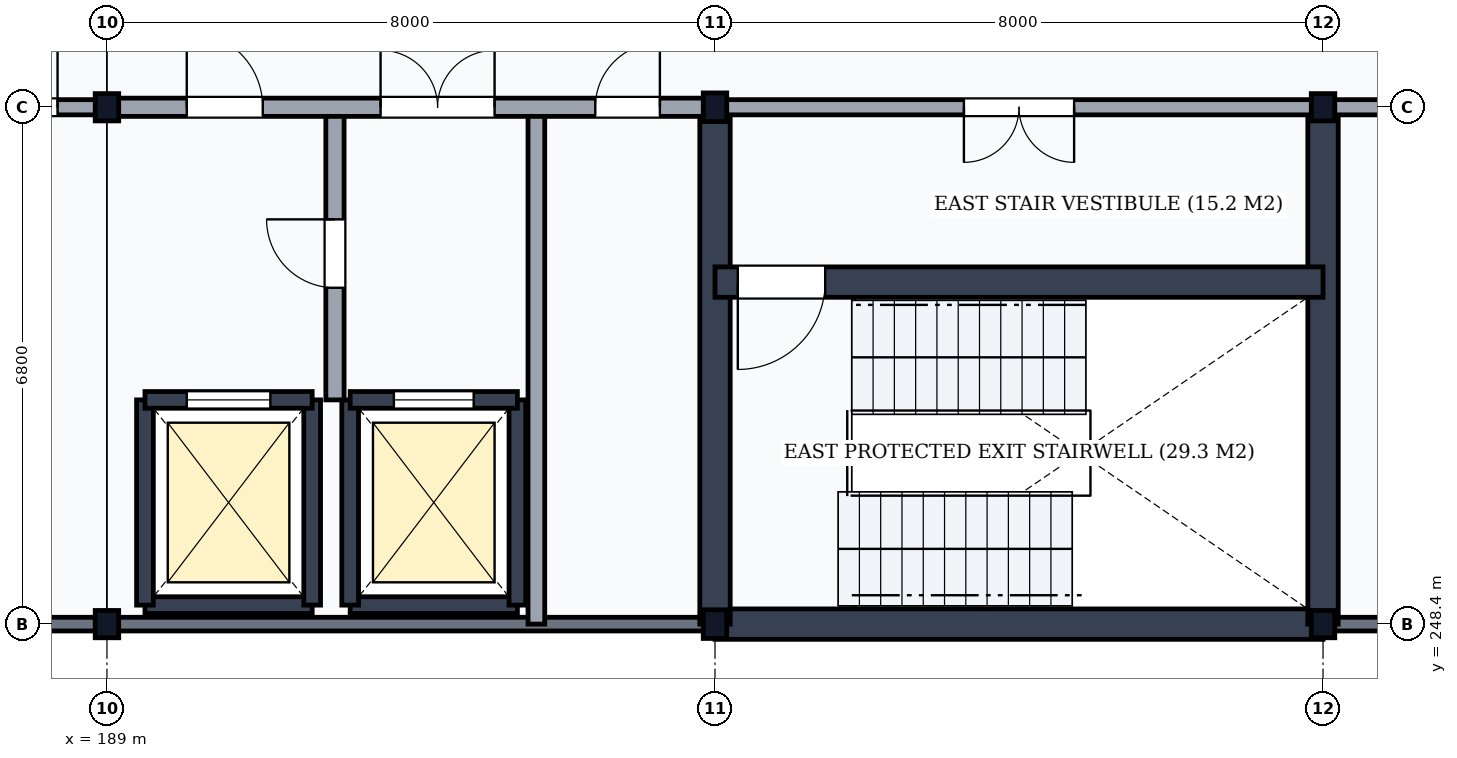
"""IFC4 building model, lengths in metres.
Left out: names, types, materials, properties, quantities, classifications, styles, units other than length and angle.
Written with IfcOpenShell. Run it as: python <this file> out.ifc"""

import sys

from ifc_helpers import new_model, si_unit, direction, frame, frame_2d, origin, origin_2d, place, context, subcontext, project, spatial, rectangle, i_section, extrude, element, fill, save


model = new_model("IFC4")
c1 = context("Model", 3, precision=1e-05, world=origin(), true_north=direction((0.0, 1.0)))
c2 = subcontext(c1, "Body", "Model", "MODEL_VIEW")
j1 = project(units=[si_unit("LENGTHUNIT", "METRE"), si_unit("PLANEANGLEUNIT", "RADIAN")], contexts=[c1])
p1 = place(None, origin())
s1 = spatial("IfcSite", under=j1, at=p1, CompositionType="ELEMENT")
p2 = place(p1, origin())
s2 = spatial("IfcBuilding", under=s1, at=p2, CompositionType="ELEMENT")
p3 = place(p2, frame((0.0, 0.0, 47.7)))
s3 = spatial("IfcBuildingStorey", under=s2, at=p3, CompositionType="ELEMENT", Elevation=47.7)
for number, where, z_axis, x_axis in (
    (1, (189.0, 248.4, 0.0), (0.0, 0.0, 1.0), (1.0, 0.0, 0.0)),
    (2, (189.0, 255.2, 0.0), (0.0, 0.0, 1.0), (1.0, 0.0, 0.0)),
):
    element("IfcColumn", number, at=place(p3, frame(where, z_axis=z_axis, x_axis=x_axis)), inside=s3, PredefinedType="COLUMN", context=c2, shape_type="SweptSolid", body=[
        extrude(i_section(OverallWidth=0.309, OverallDepth=0.359, WebThickness=0.021, FlangeThickness=0.04, FilletRadius=0.027, at=origin_2d()), origin(), (0.0, 0.0, 1.0), 3.9),
    ])
for number, where, z_axis, x_axis in (
    (3, (197.0, 248.4, 0.0), (0.0, 0.0, 1.0), (1.0, 0.0, 0.0)),
    (4, (197.0, 255.2, 0.0), (0.0, 0.0, 1.0), (1.0, 0.0, 0.0)),
):
    element("IfcColumn", number, at=place(p3, frame(where, z_axis=z_axis, x_axis=x_axis)), inside=s3, PredefinedType="COLUMN", context=c2, shape_type="SweptSolid", body=[
        extrude(i_section(OverallWidth=0.309, OverallDepth=0.377, WebThickness=0.021, FlangeThickness=0.04, FilletRadius=0.027, at=origin_2d()), origin(), (0.0, 0.0, 1.0), 3.9),
    ])
for number, where, z_axis, x_axis in (
    (5, (205.0, 248.4, 0.0), (0.0, 0.0, 1.0), (1.0, 0.0, 0.0)),
    (6, (205.0, 255.2, 0.0), (0.0, 0.0, 1.0), (1.0, 0.0, 0.0)),
):
    element("IfcColumn", number, at=place(p3, frame(where, z_axis=z_axis, x_axis=x_axis)), inside=s3, PredefinedType="COLUMN", context=c2, shape_type="SweptSolid", body=[
        extrude(i_section(OverallWidth=0.309, OverallDepth=0.359, WebThickness=0.021, FlangeThickness=0.04, FilletRadius=0.027, at=origin_2d()), origin(), (0.0, 0.0, 1.0), 3.9),
    ])
p4 = place(p3, frame((181.006, 248.4, 0.0), z_axis=(0.0, 0.0, 1.0), x_axis=(1.0, 0.0, 0.0)))
e7 = element("IfcWall", 7, at=p4, inside=s3, PredefinedType="SOLIDWALL", context=c2, shape_type="SweptSolid", body=[
    extrude(rectangle(XDim=7.988, YDim=0.18, at=frame_2d((3.994, 0.0))), origin(), (0.0, 0.0, 1.0), 3.298),
])
p5 = place(p4, frame((2.894, 0.0, 0.95)))
e8 = element("IfcOpeningElement", 8, at=p5, cuts=e7, PredefinedType="OPENING", context=c2, shape_type="SweptSolid", body=[
    extrude(rectangle(XDim=1.6, YDim=2.0, at=frame_2d((0.8, 1.0))), frame((0.0, 0.105, 0.0), z_axis=(0.0, -1.0, 0.0), x_axis=(1.0, 0.0, 0.0)), (0.0, 0.0, 1.0), 0.21),
])
p6 = place(p3, frame((189.006, 248.4, 0.0), z_axis=(0.0, 0.0, 1.0), x_axis=(1.0, 0.0, 0.0)))
e9 = element("IfcWall", 9, at=p6, inside=s3, PredefinedType="SOLIDWALL", context=c2, shape_type="SweptSolid", body=[
    extrude(rectangle(XDim=7.988, YDim=0.18, at=frame_2d((3.994, 0.0))), origin(), (0.0, 0.0, 1.0), 3.298),
])
p7 = place(p3, frame((205.006, 248.4, 0.0), z_axis=(0.0, 0.0, 1.0), x_axis=(1.0, 0.0, 0.0)))
e10 = element("IfcWall", 10, at=p7, inside=s3, PredefinedType="SOLIDWALL", context=c2, shape_type="SweptSolid", body=[
    extrude(rectangle(XDim=7.988, YDim=0.18, at=frame_2d((3.994, 0.0))), origin(), (0.0, 0.0, 1.0), 3.298),
])
p8 = place(p7, frame((3.394, 0.0, 0.95)))
e11 = element("IfcOpeningElement", 11, at=p8, cuts=e10, PredefinedType="OPENING", context=c2, shape_type="SweptSolid", body=[
    extrude(rectangle(XDim=1.2, YDim=1.8, at=frame_2d((0.6, 0.9))), frame((0.0, 0.105, 0.0), z_axis=(0.0, -1.0, 0.0), x_axis=(1.0, 0.0, 0.0)), (0.0, 0.0, 1.0), 0.21),
])
p9 = place(p3, frame((197.0, 248.4, 0.0), z_axis=(0.0, 0.0, 1.0), x_axis=(1.0, 0.0, 0.0)))
e12 = element("IfcWall", 12, at=p9, inside=s3, PredefinedType="SHEAR", context=c2, shape_type="SweptSolid", body=[
    extrude(rectangle(XDim=8.0, YDim=0.4, at=frame_2d((4.0, 0.0))), origin(), (0.0, 0.0, 1.0), 3.61),
])
for number, where, z_axis, x_axis in (
    (13, (197.0, 248.4, 0.0), (0.0, 0.0, 1.0), (0.0, 1.0, 0.0)),
    (14, (205.0, 248.4, 0.0), (0.0, 0.0, 1.0), (0.0, 1.0, 0.0)),
):
    element("IfcWall", number, at=place(p3, frame(where, z_axis=z_axis, x_axis=x_axis)), inside=s3, PredefinedType="SHEAR", context=c2, shape_type="SweptSolid", body=[
        extrude(rectangle(XDim=6.8, YDim=0.4, at=frame_2d((3.4, 0.0))), origin(), (0.0, 0.0, 1.0), 3.61),
    ])
p10 = place(p3, frame((197.0, 252.9, 0.0), z_axis=(0.0, 0.0, 1.0), x_axis=(1.0, 0.0, 0.0)))
e15 = element("IfcWall", 15, at=p10, inside=s3, PredefinedType="SHEAR", context=c2, shape_type="SweptSolid", body=[
    extrude(rectangle(XDim=8.0, YDim=0.4, at=frame_2d((4.0, 0.0))), origin(), (0.0, 0.0, 1.0), 3.61),
])
p11 = place(p10, frame((0.3, 0.0, 0.0)))
e16 = element("IfcOpeningElement", 16, at=p11, cuts=e15, PredefinedType="OPENING", context=c2, shape_type="SweptSolid", body=[
    extrude(rectangle(XDim=1.15, YDim=2.15, at=frame_2d((0.575, 1.075))), frame((0.0, 0.215, 0.0), z_axis=(0.0, -1.0, 0.0), x_axis=(1.0, 0.0, 0.0)), (0.0, 0.0, 1.0), 0.43),
])
p12 = place(p3, frame((197.0, 255.2, 0.0), z_axis=(0.0, 0.0, 1.0), x_axis=(1.0, 0.0, 0.0)))
e17 = element("IfcWall", 17, at=p12, inside=s3, PredefinedType="PARTITIONING", context=c2, shape_type="SweptSolid", body=[
    extrude(rectangle(XDim=8.0, YDim=0.2, at=frame_2d((4.0, 0.0))), origin(), (0.0, 0.0, 1.0), 3.108),
])
p13 = place(p12, frame((3.275, 0.0, 0.0)))
e18 = element("IfcOpeningElement", 18, at=p13, cuts=e17, PredefinedType="OPENING", context=c2, shape_type="SweptSolid", body=[
    extrude(rectangle(XDim=1.45, YDim=2.2, at=frame_2d((0.725, 1.1))), frame((0.0, 0.115, 0.0), z_axis=(0.0, -1.0, 0.0), x_axis=(1.0, 0.0, 0.0)), (0.0, 0.0, 1.0), 0.23),
])
p14 = place(p3, frame((189.5, 248.65, 0.0), z_axis=(0.0, 0.0, 1.0), x_axis=(1.0, 0.0, 0.0)))
e19 = element("IfcWall", 19, at=p14, inside=s3, PredefinedType="SHEAR", context=c2, shape_type="SweptSolid", body=[
    extrude(rectangle(XDim=2.2, YDim=0.22, at=frame_2d((1.1, 0.0))), origin(), (0.0, 0.0, 1.0), 3.61),
])
for number, where, z_axis, x_axis in (
    (20, (189.5, 248.65, 0.0), (0.0, 0.0, 1.0), (0.0, 1.0, 0.0)),
    (21, (191.7, 248.65, 0.0), (0.0, 0.0, 1.0), (0.0, 1.0, 0.0)),
):
    element("IfcWall", number, at=place(p3, frame(where, z_axis=z_axis, x_axis=x_axis)), inside=s3, PredefinedType="SHEAR", context=c2, shape_type="SweptSolid", body=[
        extrude(rectangle(XDim=2.7, YDim=0.22, at=frame_2d((1.35, 0.0))), origin(), (0.0, 0.0, 1.0), 3.61),
    ])
p15 = place(p3, frame((189.5, 251.35, 0.0), z_axis=(0.0, 0.0, 1.0), x_axis=(1.0, 0.0, 0.0)))
e22 = element("IfcWall", 22, at=p15, inside=s3, PredefinedType="SHEAR", context=c2, shape_type="SweptSolid", body=[
    extrude(rectangle(XDim=2.2, YDim=0.22, at=frame_2d((1.1, 0.0))), origin(), (0.0, 0.0, 1.0), 3.61),
])
p16 = place(p15, frame((0.55, 0.0, 0.0)))
e23 = element("IfcOpeningElement", 23, at=p16, cuts=e22, PredefinedType="OPENING", context=c2, shape_type="SweptSolid", body=[
    extrude(rectangle(XDim=1.1, YDim=2.15, at=frame_2d((0.55, 1.075))), frame((0.0, 0.125, 0.0), z_axis=(0.0, -1.0, 0.0), x_axis=(1.0, 0.0, 0.0)), (0.0, 0.0, 1.0), 0.25),
])
p17 = place(p3, frame((192.2, 248.65, 0.0), z_axis=(0.0, 0.0, 1.0), x_axis=(1.0, 0.0, 0.0)))
e24 = element("IfcWall", 24, at=p17, inside=s3, PredefinedType="SHEAR", context=c2, shape_type="SweptSolid", body=[
    extrude(rectangle(XDim=2.2, YDim=0.22, at=frame_2d((1.1, 0.0))), origin(), (0.0, 0.0, 1.0), 3.61),
])
for number, where, z_axis, x_axis in (
    (25, (192.2, 248.65, 0.0), (0.0, 0.0, 1.0), (0.0, 1.0, 0.0)),
    (26, (194.4, 248.65, 0.0), (0.0, 0.0, 1.0), (0.0, 1.0, 0.0)),
):
    element("IfcWall", number, at=place(p3, frame(where, z_axis=z_axis, x_axis=x_axis)), inside=s3, PredefinedType="SHEAR", context=c2, shape_type="SweptSolid", body=[
        extrude(rectangle(XDim=2.7, YDim=0.22, at=frame_2d((1.35, 0.0))), origin(), (0.0, 0.0, 1.0), 3.61),
    ])
p18 = place(p3, frame((192.2, 251.35, 0.0), z_axis=(0.0, 0.0, 1.0), x_axis=(1.0, 0.0, 0.0)))
e27 = element("IfcWall", 27, at=p18, inside=s3, PredefinedType="SHEAR", context=c2, shape_type="SweptSolid", body=[
    extrude(rectangle(XDim=2.2, YDim=0.22, at=frame_2d((1.1, 0.0))), origin(), (0.0, 0.0, 1.0), 3.61),
])
p19 = place(p18, frame((0.575, 0.0, 0.0)))
e28 = element("IfcOpeningElement", 28, at=p19, cuts=e27, PredefinedType="OPENING", context=c2, shape_type="SweptSolid", body=[
    extrude(rectangle(XDim=1.05, YDim=2.15, at=frame_2d((0.525, 1.075))), frame((0.0, 0.125, 0.0), z_axis=(0.0, -1.0, 0.0), x_axis=(1.0, 0.0, 0.0)), (0.0, 0.0, 1.0), 0.25),
])
p20 = place(p3, frame((192.0, 251.35, 0.0), z_axis=(0.0, 0.0, 1.0), x_axis=(0.0, 1.0, 0.0)))
e29 = element("IfcWall", 29, at=p20, inside=s3, PredefinedType="PARTITIONING", context=c2, shape_type="SweptSolid", body=[
    extrude(rectangle(XDim=3.85, YDim=0.24, at=frame_2d((1.925, 0.0))), origin(), (0.0, 0.0, 1.0), 3.61),
])
p21 = place(p20, frame((1.475, 0.0, 0.0)))
e30 = element("IfcOpeningElement", 30, at=p21, cuts=e29, PredefinedType="OPENING", context=c2, shape_type="SweptSolid", body=[
    extrude(rectangle(XDim=0.9, YDim=2.1, at=frame_2d((0.45, 1.05))), frame((0.0, 0.135, 0.0), z_axis=(0.0, -1.0, 0.0), x_axis=(1.0, 0.0, 0.0)), (0.0, 0.0, 1.0), 0.27),
])
p22 = place(p3, frame((194.65, 248.4, 0.0), z_axis=(0.0, 0.0, 1.0), x_axis=(0.0, 1.0, 0.0)))
e31 = element("IfcWall", 31, at=p22, inside=s3, PredefinedType="PARTITIONING", context=c2, shape_type="SweptSolid", body=[
    extrude(rectangle(XDim=6.8, YDim=0.22, at=frame_2d((3.4, 0.0))), origin(), (0.0, 0.0, 1.0), 3.61),
])
p23 = place(p3, frame((181.0, 255.2, 0.0), z_axis=(0.0, 0.0, 1.0), x_axis=(1.0, 0.0, 0.0)))
e32 = element("IfcWall", 32, at=p23, inside=s3, PredefinedType="PARTITIONING", context=c2, shape_type="SweptSolid", body=[
    extrude(rectangle(XDim=8.0, YDim=0.2, at=frame_2d((4.0, 0.0))), origin(), (0.0, 0.0, 1.0), 3.108),
])
p24 = place(p23, frame((0.85, 0.0, 0.0)))
e33 = element("IfcOpeningElement", 33, at=p24, cuts=e32, PredefinedType="OPENING", context=c2, shape_type="SweptSolid", body=[
    extrude(rectangle(XDim=0.9, YDim=2.1, at=frame_2d((0.45, 1.05))), frame((0.0, 0.115, 0.0), z_axis=(0.0, -1.0, 0.0), x_axis=(1.0, 0.0, 0.0)), (0.0, 0.0, 1.0), 0.23),
])
p25 = place(p23, frame((3.25, 0.0, 0.0)))
e34 = element("IfcOpeningElement", 34, at=p25, cuts=e32, PredefinedType="OPENING", context=c2, shape_type="SweptSolid", body=[
    extrude(rectangle(XDim=0.9, YDim=2.1, at=frame_2d((0.45, 1.05))), frame((0.0, 0.115, 0.0), z_axis=(0.0, -1.0, 0.0), x_axis=(1.0, 0.0, 0.0)), (0.0, 0.0, 1.0), 0.23),
])
p26 = place(p23, frame((5.075, 0.0, 0.0)))
e35 = element("IfcOpeningElement", 35, at=p26, cuts=e32, PredefinedType="OPENING", context=c2, shape_type="SweptSolid", body=[
    extrude(rectangle(XDim=0.95, YDim=2.1, at=frame_2d((0.475, 1.05))), frame((0.0, 0.115, 0.0), z_axis=(0.0, -1.0, 0.0), x_axis=(1.0, 0.0, 0.0)), (0.0, 0.0, 1.0), 0.23),
])
p27 = place(p23, frame((6.5, 0.0, 0.0)))
e36 = element("IfcOpeningElement", 36, at=p27, cuts=e32, PredefinedType="OPENING", context=c2, shape_type="SweptSolid", body=[
    extrude(rectangle(XDim=0.85, YDim=2.1, at=frame_2d((0.425, 1.05))), frame((0.0, 0.115, 0.0), z_axis=(0.0, -1.0, 0.0), x_axis=(1.0, 0.0, 0.0)), (0.0, 0.0, 1.0), 0.23),
])
p28 = place(p3, frame((189.0, 255.2, 0.0), z_axis=(0.0, 0.0, 1.0), x_axis=(1.0, 0.0, 0.0)))
e37 = element("IfcWall", 37, at=p28, inside=s3, PredefinedType="PARTITIONING", context=c2, shape_type="SweptSolid", body=[
    extrude(rectangle(XDim=8.0, YDim=0.24, at=frame_2d((4.0, 0.0))), origin(), (0.0, 0.0, 1.0), 3.108),
])
p29 = place(p28, frame((1.05, 0.0, 0.0)))
e38 = element("IfcOpeningElement", 38, at=p29, cuts=e37, PredefinedType="OPENING", context=c2, shape_type="SweptSolid", body=[
    extrude(rectangle(XDim=1.0, YDim=2.1, at=frame_2d((0.5, 1.05))), frame((0.0, 0.135, 0.0), z_axis=(0.0, -1.0, 0.0), x_axis=(1.0, 0.0, 0.0)), (0.0, 0.0, 1.0), 0.27),
])
p30 = place(p28, frame((3.6, 0.0, 0.0)))
e39 = element("IfcOpeningElement", 39, at=p30, cuts=e37, PredefinedType="OPENING", context=c2, shape_type="SweptSolid", body=[
    extrude(rectangle(XDim=1.5, YDim=2.25, at=frame_2d((0.75, 1.125))), frame((0.0, 0.135, 0.0), z_axis=(0.0, -1.0, 0.0), x_axis=(1.0, 0.0, 0.0)), (0.0, 0.0, 1.0), 0.27),
])
p31 = place(p28, frame((6.425, 0.0, 0.0)))
e40 = element("IfcOpeningElement", 40, at=p31, cuts=e37, PredefinedType="OPENING", context=c2, shape_type="SweptSolid", body=[
    extrude(rectangle(XDim=0.85, YDim=2.1, at=frame_2d((0.425, 1.05))), frame((0.0, 0.135, 0.0), z_axis=(0.0, -1.0, 0.0), x_axis=(1.0, 0.0, 0.0)), (0.0, 0.0, 1.0), 0.27),
])
p32 = place(p3, frame((205.0, 255.2, 0.0), z_axis=(0.0, 0.0, 1.0), x_axis=(1.0, 0.0, 0.0)))
e41 = element("IfcWall", 41, at=p32, inside=s3, PredefinedType="PARTITIONING", context=c2, shape_type="SweptSolid", body=[
    extrude(rectangle(XDim=16.0, YDim=0.2, at=frame_2d((8.0, 0.0))), origin(), (0.0, 0.0, 1.0), 3.108),
])
p33 = place(p32, frame((3.5, 0.0, 0.0)))
e42 = element("IfcOpeningElement", 42, at=p33, cuts=e41, PredefinedType="OPENING", context=c2, shape_type="SweptSolid", body=[
    extrude(rectangle(XDim=1.0, YDim=2.1, at=frame_2d((0.5, 1.05))), frame((0.0, 0.115, 0.0), z_axis=(0.0, -1.0, 0.0), x_axis=(1.0, 0.0, 0.0)), (0.0, 0.0, 1.0), 0.23),
])
p34 = place(p11, frame((1.15, 0.0, 0.0), z_axis=(0.0, 0.0, 1.0), x_axis=(-1.0, 0.0, 0.0)))
e43 = element("IfcDoor", 43, at=p34, inside=s3, OperationType="SINGLE_SWING_RIGHT", PredefinedType="DOOR", context=c2, shape_type="SweptSolid", body=[
    extrude(rectangle(XDim=1.15, YDim=2.15, at=frame_2d((0.575, 1.075))), frame((0.0, 0.025, 0.0), z_axis=(0.0, -1.0, 0.0), x_axis=(1.0, 0.0, 0.0)), (0.0, 0.0, 1.0), 0.05),
])
fill(e16, e43)
p35 = place(p13, frame((1.45, 0.0, 0.0), z_axis=(0.0, 0.0, 1.0), x_axis=(-1.0, 0.0, 0.0)))
e44 = element("IfcDoor", 44, at=p35, inside=s3, OperationType="DOUBLE_DOOR_SINGLE_SWING", PredefinedType="DOOR", context=c2, shape_type="SweptSolid", body=[
    extrude(rectangle(XDim=1.45, YDim=2.2, at=frame_2d((0.725, 1.1))), frame((0.0, 0.025, 0.0), z_axis=(0.0, -1.0, 0.0), x_axis=(1.0, 0.0, 0.0)), (0.0, 0.0, 1.0), 0.05),
])
fill(e18, e44)
p36 = place(p16, origin())
e45 = element("IfcDoor", 45, at=p36, inside=s3, OperationType="DOUBLE_DOOR_SLIDING", PredefinedType="USERDEFINED", context=c2, shape_type="SweptSolid", body=[
    extrude(rectangle(XDim=1.1, YDim=2.15, at=frame_2d((0.55, 1.075))), frame((0.0, 0.025, 0.0), z_axis=(0.0, -1.0, 0.0), x_axis=(1.0, 0.0, 0.0)), (0.0, 0.0, 1.0), 0.05),
])
fill(e23, e45)
p37 = place(p19, origin())
e46 = element("IfcDoor", 46, at=p37, inside=s3, OperationType="DOUBLE_DOOR_SLIDING", PredefinedType="USERDEFINED", context=c2, shape_type="SweptSolid", body=[
    extrude(rectangle(XDim=1.05, YDim=2.15, at=frame_2d((0.525, 1.075))), frame((0.0, 0.025, 0.0), z_axis=(0.0, -1.0, 0.0), x_axis=(1.0, 0.0, 0.0)), (0.0, 0.0, 1.0), 0.05),
])
fill(e28, e46)
p38 = place(p21, frame((0.9, 0.0, 0.0), z_axis=(0.0, 0.0, 1.0), x_axis=(-1.0, 0.0, 0.0)))
e47 = element("IfcDoor", 47, at=p38, inside=s3, OperationType="SINGLE_SWING_LEFT", PredefinedType="DOOR", context=c2, shape_type="SweptSolid", body=[
    extrude(rectangle(XDim=0.9, YDim=2.1, at=frame_2d((0.45, 1.05))), frame((0.0, 0.025, 0.0), z_axis=(0.0, -1.0, 0.0), x_axis=(1.0, 0.0, 0.0)), (0.0, 0.0, 1.0), 0.05),
])
fill(e30, e47)
p39 = place(p27, frame((0.85, 0.0, 0.0), z_axis=(0.0, 0.0, 1.0), x_axis=(-1.0, 0.0, 0.0)))
e48 = element("IfcDoor", 48, at=p39, inside=s3, OperationType="SINGLE_SWING_LEFT", PredefinedType="DOOR", context=c2, shape_type="SweptSolid", body=[
    extrude(rectangle(XDim=0.85, YDim=2.1, at=frame_2d((0.425, 1.05))), frame((0.0, 0.025, 0.0), z_axis=(0.0, -1.0, 0.0), x_axis=(1.0, 0.0, 0.0)), (0.0, 0.0, 1.0), 0.05),
])
fill(e36, e48)
p40 = place(p29, origin())
e49 = element("IfcDoor", 49, at=p40, inside=s3, OperationType="SINGLE_SWING_LEFT", PredefinedType="DOOR", context=c2, shape_type="SweptSolid", body=[
    extrude(rectangle(XDim=1.0, YDim=2.1, at=frame_2d((0.5, 1.05))), frame((0.0, 0.025, 0.0), z_axis=(0.0, -1.0, 0.0), x_axis=(1.0, 0.0, 0.0)), (0.0, 0.0, 1.0), 0.05),
])
fill(e38, e49)
p41 = place(p30, origin())
e50 = element("IfcDoor", 50, at=p41, inside=s3, OperationType="DOUBLE_DOOR_SINGLE_SWING", PredefinedType="DOOR", context=c2, shape_type="SweptSolid", body=[
    extrude(rectangle(XDim=1.5, YDim=2.25, at=frame_2d((0.75, 1.125))), frame((0.0, 0.025, 0.0), z_axis=(0.0, -1.0, 0.0), x_axis=(1.0, 0.0, 0.0)), (0.0, 0.0, 1.0), 0.05),
])
fill(e39, e50)
p42 = place(p31, frame((0.85, 0.0, 0.0), z_axis=(0.0, 0.0, 1.0), x_axis=(-1.0, 0.0, 0.0)))
e51 = element("IfcDoor", 51, at=p42, inside=s3, OperationType="SINGLE_SWING_LEFT", PredefinedType="DOOR", context=c2, shape_type="SweptSolid", body=[
    extrude(rectangle(XDim=0.85, YDim=2.1, at=frame_2d((0.425, 1.05))), frame((0.0, 0.025, 0.0), z_axis=(0.0, -1.0, 0.0), x_axis=(1.0, 0.0, 0.0)), (0.0, 0.0, 1.0), 0.05),
])
fill(e40, e51)
save(model, sys.argv[1])
